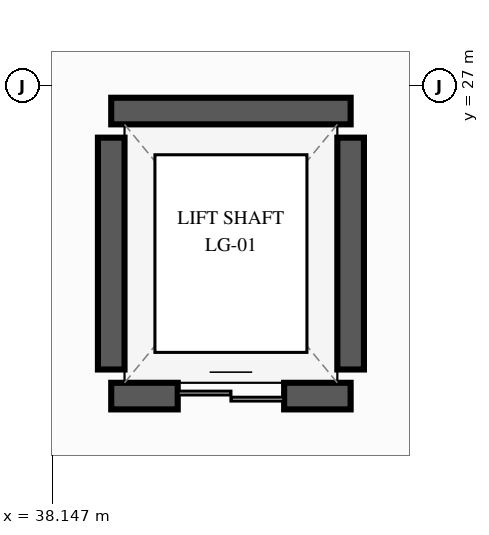
"""IFC4 building model, lengths in metres.
Left out: names, types, materials, properties, quantities, classifications, styles, units other than length and angle.
Written with IfcOpenShell. Run it as: python <this file> out.ifc"""

import sys

from ifc_helpers import new_model, si_unit, direction, frame, frame_2d, origin, place, context, subcontext, project, spatial, rectangle, extrude, element, fill, save


model = new_model("IFC4")
c1 = context("Model", 3, precision=1e-05, world=origin(), true_north=direction((0.0, 1.0)))
c2 = subcontext(c1, "Body", "Model", "MODEL_VIEW")
j1 = project(units=[si_unit("LENGTHUNIT", "METRE"), si_unit("PLANEANGLEUNIT", "RADIAN")], contexts=[c1])
p1 = place(None, origin())
s1 = spatial("IfcSite", under=j1, at=p1, CompositionType="ELEMENT")
p2 = place(p1, origin())
s2 = spatial("IfcBuilding", under=s1, at=p2, CompositionType="ELEMENT")
p3 = place(p2, frame((0.0, 0.0, -6.0)))
s3 = spatial("IfcBuildingStorey", under=s2, at=p3, CompositionType="ELEMENT", Elevation=-6.0)
p4 = place(p3, frame((38.925, 22.925, 0.0), z_axis=(0.0, 0.0, 1.0), x_axis=(1.0, 0.0, 0.0)))
e1 = element("IfcWall", 1, at=p4, inside=s3, PredefinedType="SHEAR", context=c2, shape_type="SweptSolid", body=[
    extrude(rectangle(XDim=3.15, YDim=0.35, at=frame_2d((1.575, 0.0))), origin(), (0.0, 0.0, 1.0), 5.7),
])
p5 = place(p4, frame((0.875, 0.0, 0.0)))
e2 = element("IfcOpeningElement", 2, at=p5, cuts=e1, PredefinedType="OPENING", context=c2, shape_type="SweptSolid", body=[
    extrude(rectangle(XDim=1.4, YDim=2.3, at=frame_2d((0.7, 1.15))), frame((0.0, 0.185, 0.0), z_axis=(0.0, -1.0, 0.0), x_axis=(1.0, 0.0, 0.0)), (0.0, 0.0, 1.0), 0.37),
])
p6 = place(p3, frame((42.075, 26.675, 0.0), z_axis=(0.0, 0.0, 1.0), x_axis=(-1.0, 0.0, 0.0)))
e3 = element("IfcWall", 3, at=p6, inside=s3, PredefinedType="SHEAR", context=c2, shape_type="SweptSolid", body=[
    extrude(rectangle(XDim=3.15, YDim=0.35, at=frame_2d((1.575, 0.0))), origin(), (0.0, 0.0, 1.0), 5.7),
])
for number, where, z_axis, x_axis in (
    (4, (38.925, 23.275, 0.0), (0.0, 0.0, 1.0), (0.0, 1.0, 0.0)),
    (5, (42.075, 23.275, 0.0), (0.0, 0.0, 1.0), (0.0, 1.0, 0.0)),
):
    element("IfcWall", number, at=place(p3, frame(where, z_axis=z_axis, x_axis=x_axis)), inside=s3, PredefinedType="SHEAR", context=c2, shape_type="SweptSolid", body=[
        extrude(rectangle(XDim=3.05, YDim=0.35, at=frame_2d((1.525, 0.0))), origin(), (0.0, 0.0, 1.0), 5.7),
    ])
p7 = place(p5, origin())
e6 = element("IfcDoor", 6, at=p7, inside=s3, OperationType="DOUBLE_DOOR_SLIDING", PredefinedType="DOOR", context=c2, shape_type="SweptSolid", body=[
    extrude(rectangle(XDim=1.4, YDim=2.3, at=frame_2d((0.7, 1.15))), frame((0.0, 0.025, 0.0), z_axis=(0.0, -1.0, 0.0), x_axis=(1.0, 0.0, 0.0)), (0.0, 0.0, 1.0), 0.05),
])
fill(e2, e6)
save(model, sys.argv[1])
